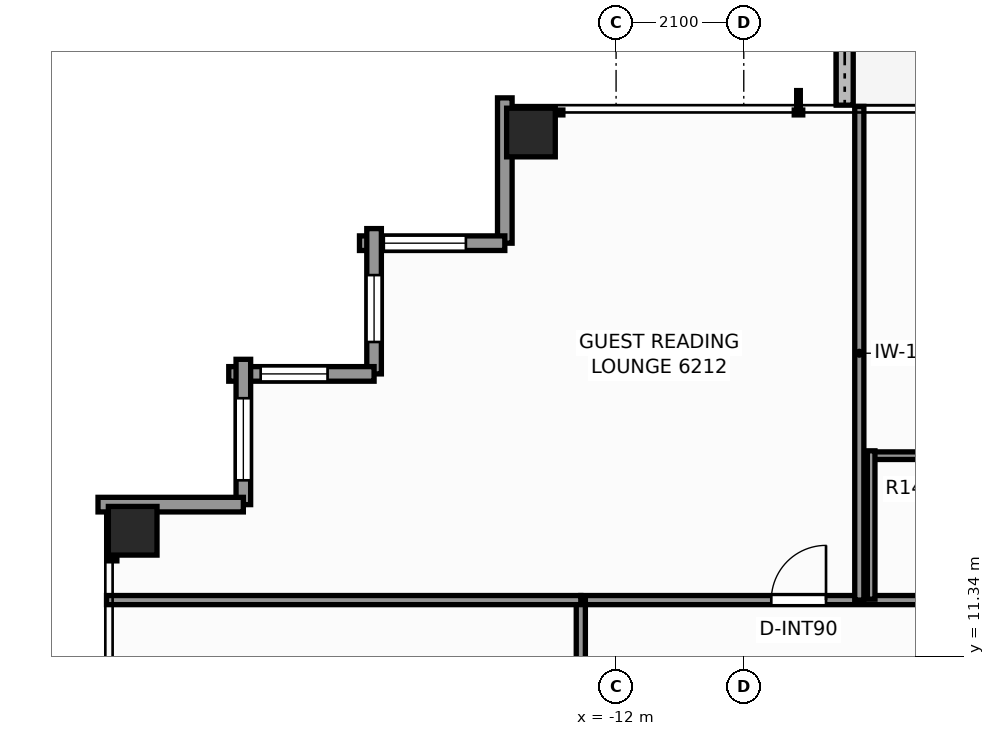
"""IFC4 building model, lengths in metres.
Left out: names, types, materials, properties, quantities, classifications, styles, units other than length and angle.
Written with IfcOpenShell. Run it as: python <this file> out.ifc"""

import sys

from ifc_helpers import new_model, si_unit, direction, frame, frame_2d, origin, origin_2d, place, context, subcontext, project, spatial, rectangle, extrude, element, fill, save


model = new_model("IFC4")
c1 = context("Model", 3, precision=1e-05, world=origin(), true_north=direction((0.0, 1.0)))
c2 = subcontext(c1, "Body", "Model", "MODEL_VIEW")
j1 = project(units=[si_unit("LENGTHUNIT", "METRE"), si_unit("PLANEANGLEUNIT", "RADIAN")], contexts=[c1])
p1 = place(None, origin())
s1 = spatial("IfcSite", under=j1, at=p1, CompositionType="ELEMENT")
p2 = place(p1, origin())
s2 = spatial("IfcBuilding", under=s1, at=p2, CompositionType="ELEMENT")
p3 = place(p2, frame((0.0, 0.0, 213.0)))
s3 = spatial("IfcBuildingStorey", under=s2, at=p3, CompositionType="ELEMENT", Elevation=213.0)
for number, where, z_axis, x_axis in (
    (1, (-13.4, 19.95, 0.0), (0.0, 0.0, 1.0), (1.0, 0.0, 0.0)),
    (2, (-19.95, 13.4, 0.0), (0.0, 0.0, 1.0), (1.0, 0.0, 0.0)),
):
    element("IfcColumn", number, at=place(p3, frame(where, z_axis=z_axis, x_axis=x_axis)), inside=s3, PredefinedType="COLUMN", context=c2, shape_type="SweptSolid", body=[
        extrude(rectangle(XDim=0.8, YDim=0.8, at=origin_2d()), origin(), (0.0, 0.0, 1.0), 3.3),
    ])
p4 = place(p3, frame((-8.24, 23.375, -0.04), z_axis=(0.0, 0.0, 1.0), x_axis=(0.0, -1.0, 0.0)))
e3 = element("IfcWall", 3, at=p4, inside=s3, PredefinedType="PARAPET", context=c2, shape_type="SweptSolid", body=[
    extrude(rectangle(XDim=2.975, YDim=0.28, at=frame_2d((1.487, 0.0))), origin(), (0.0, 0.0, 1.0), 0.42),
])
p5 = place(p3, frame((-13.83, 18.13, 0.0), z_axis=(0.0, 0.0, 1.0), x_axis=(0.0, 1.0, 0.0)))
e4 = element("IfcWall", 4, at=p5, inside=s3, PredefinedType="STANDARD", context=c2, shape_type="SweptSolid", body=[
    extrude(rectangle(XDim=2.39, YDim=0.24, at=frame_2d((1.195, 0.0))), origin(), (0.0, 0.0, 1.0), 2.463),
])
p6 = place(p3, frame((-16.22, 18.13, 0.0), z_axis=(0.0, 0.0, 1.0), x_axis=(1.0, 0.0, 0.0)))
e5 = element("IfcWall", 5, at=p6, inside=s3, PredefinedType="STANDARD", context=c2, shape_type="SweptSolid", body=[
    extrude(rectangle(XDim=2.39, YDim=0.24, at=frame_2d((1.195, 0.0))), origin(), (0.0, 0.0, 1.0), 2.463),
])
p7 = place(p6, frame((0.4, 0.0, 0.65)))
e6 = element("IfcOpeningElement", 6, at=p7, cuts=e5, PredefinedType="OPENING", context=c2, shape_type="SweptSolid", body=[
    extrude(rectangle(XDim=1.35, YDim=1.55, at=frame_2d((0.675, 0.775))), frame((0.0, 0.13, 0.0), z_axis=(0.0, -1.0, 0.0), x_axis=(1.0, 0.0, 0.0)), (0.0, 0.0, 1.0), 0.26),
])
p8 = place(p3, frame((-15.98, 15.98, 0.0), z_axis=(0.0, 0.0, 1.0), x_axis=(0.0, 1.0, 0.0)))
e7 = element("IfcWall", 7, at=p8, inside=s3, PredefinedType="STANDARD", context=c2, shape_type="SweptSolid", body=[
    extrude(rectangle(XDim=2.39, YDim=0.24, at=frame_2d((1.195, 0.0))), origin(), (0.0, 0.0, 1.0), 2.463),
])
p9 = place(p8, frame((0.525, 0.0, 0.65)))
e8 = element("IfcOpeningElement", 8, at=p9, cuts=e7, PredefinedType="OPENING", context=c2, shape_type="SweptSolid", body=[
    extrude(rectangle(XDim=1.1, YDim=1.45, at=frame_2d((0.55, 0.725))), frame((0.0, 0.13, 0.0), z_axis=(0.0, -1.0, 0.0), x_axis=(1.0, 0.0, 0.0)), (0.0, 0.0, 1.0), 0.26),
])
p10 = place(p3, frame((-18.37, 15.98, 0.0), z_axis=(0.0, 0.0, 1.0), x_axis=(1.0, 0.0, 0.0)))
e9 = element("IfcWall", 9, at=p10, inside=s3, PredefinedType="STANDARD", context=c2, shape_type="SweptSolid", body=[
    extrude(rectangle(XDim=2.39, YDim=0.24, at=frame_2d((1.195, 0.0))), origin(), (0.0, 0.0, 1.0), 2.463),
])
p11 = place(p10, frame((0.525, 0.0, 0.65)))
e10 = element("IfcOpeningElement", 10, at=p11, cuts=e9, PredefinedType="OPENING", context=c2, shape_type="SweptSolid", body=[
    extrude(rectangle(XDim=1.1, YDim=1.45, at=frame_2d((0.55, 0.725))), frame((0.0, 0.13, 0.0), z_axis=(0.0, -1.0, 0.0), x_axis=(1.0, 0.0, 0.0)), (0.0, 0.0, 1.0), 0.26),
])
p12 = place(p3, frame((-18.13, 13.83, 0.0), z_axis=(0.0, 0.0, 1.0), x_axis=(0.0, 1.0, 0.0)))
e11 = element("IfcWall", 11, at=p12, inside=s3, PredefinedType="STANDARD", context=c2, shape_type="SweptSolid", body=[
    extrude(rectangle(XDim=2.39, YDim=0.24, at=frame_2d((1.195, 0.0))), origin(), (0.0, 0.0, 1.0), 2.463),
])
p13 = place(p12, frame((0.4, 0.0, 0.65)))
e12 = element("IfcOpeningElement", 12, at=p13, cuts=e11, PredefinedType="OPENING", context=c2, shape_type="SweptSolid", body=[
    extrude(rectangle(XDim=1.35, YDim=1.55, at=frame_2d((0.675, 0.775))), frame((0.0, 0.13, 0.0), z_axis=(0.0, -1.0, 0.0), x_axis=(1.0, 0.0, 0.0)), (0.0, 0.0, 1.0), 0.26),
])
p14 = place(p3, frame((-20.52, 13.83, 0.0), z_axis=(0.0, 0.0, 1.0), x_axis=(1.0, 0.0, 0.0)))
e13 = element("IfcWall", 13, at=p14, inside=s3, PredefinedType="STANDARD", context=c2, shape_type="SweptSolid", body=[
    extrude(rectangle(XDim=2.39, YDim=0.24, at=frame_2d((1.195, 0.0))), origin(), (0.0, 0.0, 1.0), 2.463),
])
p15 = place(p3, frame((-12.58, 12.26, 0.0), z_axis=(0.0, 0.0, 1.0), x_axis=(1.0, 0.0, 0.0)))
e14 = element("IfcWall", 14, at=p15, inside=s3, PredefinedType="PARTITIONING", context=c2, shape_type="SweptSolid", body=[
    extrude(rectangle(XDim=25.16, YDim=0.15, at=frame_2d((12.58, 0.0))), origin(), (0.0, 0.0, 1.0), 2.369),
])
p16 = place(p15, frame((3.133, 0.0, 0.0)))
e15 = element("IfcOpeningElement", 15, at=p16, cuts=e14, PredefinedType="OPENING", context=c2, shape_type="SweptSolid", body=[
    extrude(rectangle(XDim=0.9, YDim=2.06, at=frame_2d((0.45, 1.03))), frame((0.0, 0.085, 0.0), z_axis=(0.0, -1.0, 0.0), x_axis=(1.0, 0.0, 0.0)), (0.0, 0.0, 1.0), 0.17),
])
p17 = place(p15, frame((9.188, 0.0, 0.0)))
e16 = element("IfcOpeningElement", 16, at=p17, cuts=e14, PredefinedType="OPENING", context=c2, shape_type="SweptSolid", body=[
    extrude(rectangle(XDim=0.95, YDim=2.06, at=frame_2d((0.475, 1.03))), frame((0.0, 0.085, 0.0), z_axis=(0.0, -1.0, 0.0), x_axis=(1.0, 0.0, 0.0)), (0.0, 0.0, 1.0), 0.17),
])
p18 = place(p15, frame((13.087, 0.0, 0.0)))
e17 = element("IfcOpeningElement", 17, at=p18, cuts=e14, PredefinedType="OPENING", context=c2, shape_type="SweptSolid", body=[
    extrude(rectangle(XDim=0.95, YDim=2.06, at=frame_2d((0.475, 1.03))), frame((0.0, 0.085, 0.0), z_axis=(0.0, -1.0, 0.0), x_axis=(1.0, 0.0, 0.0)), (0.0, 0.0, 1.0), 0.17),
])
p19 = place(p15, frame((19.665, 0.0, 0.0)))
e18 = element("IfcOpeningElement", 18, at=p19, cuts=e14, PredefinedType="OPENING", context=c2, shape_type="SweptSolid", body=[
    extrude(rectangle(XDim=0.9, YDim=2.06, at=frame_2d((0.45, 1.03))), frame((0.0, 0.085, 0.0), z_axis=(0.0, -1.0, 0.0), x_axis=(1.0, 0.0, 0.0)), (0.0, 0.0, 1.0), 0.17),
])
p20 = place(p3, frame((-12.58, -12.58, 0.0), z_axis=(0.0, 0.0, 1.0), x_axis=(0.0, 1.0, 0.0)))
e19 = element("IfcWall", 19, at=p20, inside=s3, PredefinedType="PARTITIONING", context=c2, shape_type="SweptSolid", body=[
    extrude(rectangle(XDim=24.84, YDim=0.15, at=frame_2d((12.42, 0.0))), origin(), (0.0, 0.0, 1.0), 2.369),
])
p21 = place(p20, frame((3.856, 0.0, 0.0)))
e20 = element("IfcOpeningElement", 20, at=p21, cuts=e19, PredefinedType="OPENING", context=c2, shape_type="SweptSolid", body=[
    extrude(rectangle(XDim=0.95, YDim=2.06, at=frame_2d((0.475, 1.03))), frame((0.0, 0.085, 0.0), z_axis=(0.0, -1.0, 0.0), x_axis=(1.0, 0.0, 0.0)), (0.0, 0.0, 1.0), 0.17),
])
p22 = place(p20, frame((9.958, 0.0, 0.0)))
e21 = element("IfcOpeningElement", 21, at=p22, cuts=e19, PredefinedType="OPENING", context=c2, shape_type="SweptSolid", body=[
    extrude(rectangle(XDim=0.95, YDim=2.06, at=frame_2d((0.475, 1.03))), frame((0.0, 0.085, 0.0), z_axis=(0.0, -1.0, 0.0), x_axis=(1.0, 0.0, 0.0)), (0.0, 0.0, 1.0), 0.17),
])
p23 = place(p20, frame((19.64, 0.0, 0.0)))
e22 = element("IfcOpeningElement", 22, at=p23, cuts=e19, PredefinedType="OPENING", context=c2, shape_type="SweptSolid", body=[
    extrude(rectangle(XDim=0.95, YDim=2.06, at=frame_2d((0.475, 1.03))), frame((0.0, 0.085, 0.0), z_axis=(0.0, -1.0, 0.0), x_axis=(1.0, 0.0, 0.0)), (0.0, 0.0, 1.0), 0.17),
])
p24 = place(p3, frame((-20.38, 12.26, 0.0), z_axis=(0.0, 0.0, 1.0), x_axis=(1.0, 0.0, 0.0)))
e23 = element("IfcWall", 23, at=p24, inside=s3, PredefinedType="PARTITIONING", context=c2, shape_type="SweptSolid", body=[
    extrude(rectangle(XDim=7.8, YDim=0.15, at=frame_2d((3.9, 0.0))), origin(), (0.0, 0.0, 1.0), 2.369),
])
p25 = place(p3, frame((-8.0, 12.26, 0.0), z_axis=(0.0, 0.0, 1.0), x_axis=(0.0, 1.0, 0.0)))
e24 = element("IfcWall", 24, at=p25, inside=s3, PredefinedType="PARTITIONING", context=c2, shape_type="SweptSolid", body=[
    extrude(rectangle(XDim=8.12, YDim=0.15, at=frame_2d((4.06, 0.0))), origin(), (0.0, 0.0, 1.0), 2.453),
])
p26 = place(p3, frame((-7.865, 14.635, 0.0), z_axis=(0.0, 0.0, 1.0), x_axis=(1.0, 0.0, 0.0)))
e25 = element("IfcWall", 25, at=p26, inside=s3, PredefinedType="PARTITIONING", context=c2, shape_type="SweptSolid", body=[
    extrude(rectangle(XDim=2.27, YDim=0.125, at=frame_2d((1.135, 0.0))), origin(), (0.0, 0.0, 1.0), 3.08),
])
p27 = place(p3, frame((-7.805, 12.275, 0.0), z_axis=(0.0, 0.0, 1.0), x_axis=(0.0, 1.0, 0.0)))
e26 = element("IfcWall", 26, at=p27, inside=s3, PredefinedType="PARTITIONING", context=c2, shape_type="SweptSolid", body=[
    extrude(rectangle(XDim=2.44, YDim=0.125, at=frame_2d((1.22, 0.0))), origin(), (0.0, 0.0, 1.0), 3.08),
])
p28 = place(p7, origin())
e27 = element("IfcWindow", 27, at=p28, inside=s3, PartitioningType="SINGLE_PANEL", PredefinedType="WINDOW", context=c2, shape_type="SweptSolid", body=[
    extrude(rectangle(XDim=1.35, YDim=1.55, at=frame_2d((0.675, 0.775))), frame((0.0, 0.03, 0.0), z_axis=(0.0, -1.0, 0.0), x_axis=(1.0, 0.0, 0.0)), (0.0, 0.0, 1.0), 0.06),
])
fill(e6, e27)
p29 = place(p9, origin())
e28 = element("IfcWindow", 28, at=p29, inside=s3, PartitioningType="SINGLE_PANEL", PredefinedType="WINDOW", context=c2, shape_type="SweptSolid", body=[
    extrude(rectangle(XDim=1.1, YDim=1.45, at=frame_2d((0.55, 0.725))), frame((0.0, 0.03, 0.0), z_axis=(0.0, -1.0, 0.0), x_axis=(1.0, 0.0, 0.0)), (0.0, 0.0, 1.0), 0.06),
])
fill(e8, e28)
p30 = place(p11, origin())
e29 = element("IfcWindow", 29, at=p30, inside=s3, PartitioningType="SINGLE_PANEL", PredefinedType="WINDOW", context=c2, shape_type="SweptSolid", body=[
    extrude(rectangle(XDim=1.1, YDim=1.45, at=frame_2d((0.55, 0.725))), frame((0.0, 0.03, 0.0), z_axis=(0.0, -1.0, 0.0), x_axis=(1.0, 0.0, 0.0)), (0.0, 0.0, 1.0), 0.06),
])
fill(e10, e29)
p31 = place(p13, origin())
e30 = element("IfcWindow", 30, at=p31, inside=s3, PartitioningType="SINGLE_PANEL", PredefinedType="WINDOW", context=c2, shape_type="SweptSolid", body=[
    extrude(rectangle(XDim=1.35, YDim=1.55, at=frame_2d((0.675, 0.775))), frame((0.0, 0.03, 0.0), z_axis=(0.0, -1.0, 0.0), x_axis=(1.0, 0.0, 0.0)), (0.0, 0.0, 1.0), 0.06),
])
fill(e12, e30)
p32 = place(p16, origin())
e31 = element("IfcDoor", 31, at=p32, inside=s3, OperationType="SINGLE_SWING_RIGHT", PredefinedType="DOOR", context=c2, shape_type="SweptSolid", body=[
    extrude(rectangle(XDim=0.9, YDim=2.06, at=frame_2d((0.45, 1.03))), frame((0.0, 0.025, 0.0), z_axis=(0.0, -1.0, 0.0), x_axis=(1.0, 0.0, 0.0)), (0.0, 0.0, 1.0), 0.05),
])
fill(e15, e31)
save(model, sys.argv[1])
